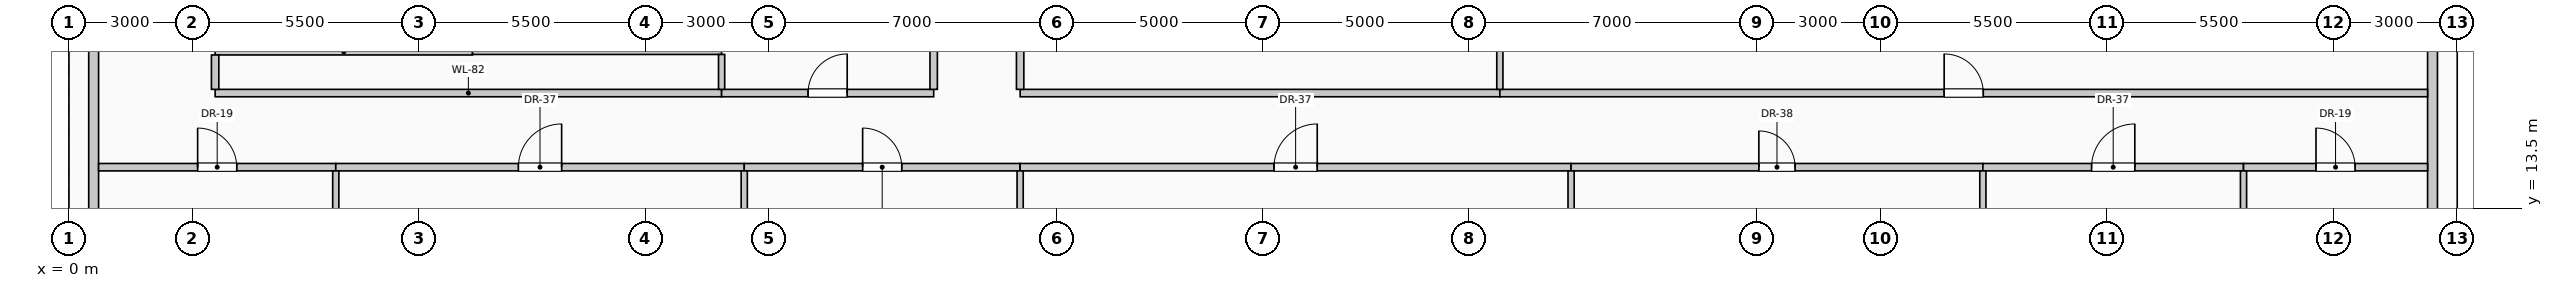
"""IFC4 building model, lengths in metres.
Left out: names, types, materials, properties, quantities, classifications, styles, units other than length and angle.
Written with IfcOpenShell. Run it as: python <this file> out.ifc"""

import sys

from ifc_helpers import new_model, si_unit, direction, frame, frame_2d, origin, place, context, subcontext, project, spatial, rectangle, extrude, element, fill, save


model = new_model("IFC4")
c1 = context("Model", 3, precision=1e-05, world=origin(), true_north=direction((0.0, 1.0)))
c2 = subcontext(c1, "Body", "Model", "MODEL_VIEW")
j1 = project(units=[si_unit("LENGTHUNIT", "METRE"), si_unit("PLANEANGLEUNIT", "RADIAN")], contexts=[c1])
p1 = place(None, origin())
s1 = spatial("IfcSite", under=j1, at=p1, CompositionType="ELEMENT")
p2 = place(p1, origin())
s2 = spatial("IfcBuilding", under=s1, at=p2, CompositionType="ELEMENT")
p3 = place(p2, frame((0.0, 0.0, 206.6)))
s3 = spatial("IfcBuildingStorey", under=s2, at=p3, CompositionType="ELEMENT", Elevation=206.6)
p4 = place(p3, frame((0.6, 10.42, 0.0), z_axis=(0.0, 0.0, 1.0), x_axis=(0.0, 1.0, 0.0)))
e1 = element("IfcWall", 1, at=p4, inside=s3, PredefinedType="SOLIDWALL", context=c2, shape_type="SweptSolid", body=[
    extrude(rectangle(XDim=7.16, YDim=0.24, at=frame_2d((3.58, 0.0))), origin(), (0.0, 0.0, 1.0), 3.0),
])
p5 = place(p4, frame((1.187, 0.0, 0.42)))
e2 = element("IfcOpeningElement", 2, at=p5, cuts=e1, PredefinedType="OPENING", context=c2, shape_type="SweptSolid", body=[
    extrude(rectangle(XDim=1.8, YDim=2.2, at=frame_2d((0.9, 1.1))), frame((0.0, 0.13, 0.0), z_axis=(0.0, -1.0, 0.0), x_axis=(1.0, 0.0, 0.0)), (0.0, 0.0, 1.0), 0.26),
])
p6 = place(p3, frame((57.4, 17.58, 0.0), z_axis=(0.0, 0.0, 1.0), x_axis=(0.0, -1.0, 0.0)))
e3 = element("IfcWall", 3, at=p6, inside=s3, PredefinedType="SOLIDWALL", context=c2, shape_type="SweptSolid", body=[
    extrude(rectangle(XDim=7.16, YDim=0.24, at=frame_2d((3.58, 0.0))), origin(), (0.0, 0.0, 1.0), 3.0),
])
p7 = place(p6, frame((4.173, 0.0, 0.42)))
e4 = element("IfcOpeningElement", 4, at=p7, cuts=e3, PredefinedType="OPENING", context=c2, shape_type="SweptSolid", body=[
    extrude(rectangle(XDim=1.8, YDim=2.2, at=frame_2d((0.9, 1.1))), frame((0.0, 0.13, 0.0), z_axis=(0.0, -1.0, 0.0), x_axis=(1.0, 0.0, 0.0)), (0.0, 0.0, 1.0), 0.26),
])
p8 = place(p3, frame((0.72, 14.5, 0.0), z_axis=(0.0, 0.0, 1.0), x_axis=(1.0, 0.0, 0.0)))
e5 = element("IfcWall", 5, at=p8, inside=s3, PredefinedType="PARTITIONING", context=c2, shape_type="SweptSolid", body=[
    extrude(rectangle(XDim=5.76, YDim=0.18, at=frame_2d((2.88, 0.0))), origin(), (0.0, 0.0, 1.0), 3.75),
])
p9 = place(p8, frame((2.405, 0.0, 0.0)))
e6 = element("IfcOpeningElement", 6, at=p9, cuts=e5, PredefinedType="OPENING", context=c2, shape_type="SweptSolid", body=[
    extrude(rectangle(XDim=0.95, YDim=2.15, at=frame_2d((0.475, 1.075))), frame((0.0, 0.1, 0.0), z_axis=(0.0, -1.0, 0.0), x_axis=(1.0, 0.0, 0.0)), (0.0, 0.0, 1.0), 0.2),
])
p10 = place(p3, frame((6.48, 14.5, 0.0), z_axis=(0.0, 0.0, 1.0), x_axis=(1.0, 0.0, 0.0)))
e7 = element("IfcWall", 7, at=p10, inside=s3, PredefinedType="PARTITIONING", context=c2, shape_type="SweptSolid", body=[
    extrude(rectangle(XDim=9.92, YDim=0.18, at=frame_2d((4.96, 0.0))), origin(), (0.0, 0.0, 1.0), 3.75),
])
p11 = place(p10, frame((4.435, 0.0, 0.0)))
e8 = element("IfcOpeningElement", 8, at=p11, cuts=e7, PredefinedType="OPENING", context=c2, shape_type="SweptSolid", body=[
    extrude(rectangle(XDim=1.05, YDim=2.15, at=frame_2d((0.525, 1.075))), frame((0.0, 0.1, 0.0), z_axis=(0.0, -1.0, 0.0), x_axis=(1.0, 0.0, 0.0)), (0.0, 0.0, 1.0), 0.2),
])
p12 = place(p3, frame((16.4, 14.5, 0.0), z_axis=(0.0, 0.0, 1.0), x_axis=(1.0, 0.0, 0.0)))
e9 = element("IfcWall", 9, at=p12, inside=s3, PredefinedType="PARTITIONING", context=c2, shape_type="SweptSolid", body=[
    extrude(rectangle(XDim=6.7, YDim=0.18, at=frame_2d((3.35, 0.0))), origin(), (0.0, 0.0, 1.0), 3.75),
])
p13 = place(p12, frame((2.875, 0.0, 0.0)))
e10 = element("IfcOpeningElement", 10, at=p13, cuts=e9, PredefinedType="OPENING", context=c2, shape_type="SweptSolid", body=[
    extrude(rectangle(XDim=0.95, YDim=2.15, at=frame_2d((0.475, 1.075))), frame((0.0, 0.1, 0.0), z_axis=(0.0, -1.0, 0.0), x_axis=(1.0, 0.0, 0.0)), (0.0, 0.0, 1.0), 0.2),
])
p14 = place(p3, frame((23.1, 14.5, 0.0), z_axis=(0.0, 0.0, 1.0), x_axis=(1.0, 0.0, 0.0)))
e11 = element("IfcWall", 11, at=p14, inside=s3, PredefinedType="PARTITIONING", context=c2, shape_type="SweptSolid", body=[
    extrude(rectangle(XDim=13.38, YDim=0.18, at=frame_2d((6.69, 0.0))), origin(), (0.0, 0.0, 1.0), 3.75),
])
p15 = place(p14, frame((6.165, 0.0, 0.0)))
e12 = element("IfcOpeningElement", 12, at=p15, cuts=e11, PredefinedType="OPENING", context=c2, shape_type="SweptSolid", body=[
    extrude(rectangle(XDim=1.05, YDim=2.15, at=frame_2d((0.525, 1.075))), frame((0.0, 0.1, 0.0), z_axis=(0.0, -1.0, 0.0), x_axis=(1.0, 0.0, 0.0)), (0.0, 0.0, 1.0), 0.2),
])
p16 = place(p3, frame((36.48, 14.5, 0.0), z_axis=(0.0, 0.0, 1.0), x_axis=(1.0, 0.0, 0.0)))
e13 = element("IfcWall", 13, at=p16, inside=s3, PredefinedType="PARTITIONING", context=c2, shape_type="SweptSolid", body=[
    extrude(rectangle(XDim=10.0, YDim=0.18, at=frame_2d((5.0, 0.0))), origin(), (0.0, 0.0, 1.0), 3.75),
])
p17 = place(p16, frame((4.56, 0.0, 0.0)))
e14 = element("IfcOpeningElement", 14, at=p17, cuts=e13, PredefinedType="OPENING", context=c2, shape_type="SweptSolid", body=[
    extrude(rectangle(XDim=0.88, YDim=2.1, at=frame_2d((0.44, 1.05))), frame((0.0, 0.1, 0.0), z_axis=(0.0, -1.0, 0.0), x_axis=(1.0, 0.0, 0.0)), (0.0, 0.0, 1.0), 0.2),
])
p18 = place(p3, frame((46.48, 14.5, 0.0), z_axis=(0.0, 0.0, 1.0), x_axis=(1.0, 0.0, 0.0)))
e15 = element("IfcWall", 15, at=p18, inside=s3, PredefinedType="PARTITIONING", context=c2, shape_type="SweptSolid", body=[
    extrude(rectangle(XDim=6.33, YDim=0.18, at=frame_2d((3.165, 0.0))), origin(), (0.0, 0.0, 1.0), 3.75),
])
p19 = place(p18, frame((2.64, 0.0, 0.0)))
e16 = element("IfcOpeningElement", 16, at=p19, cuts=e15, PredefinedType="OPENING", context=c2, shape_type="SweptSolid", body=[
    extrude(rectangle(XDim=1.05, YDim=2.15, at=frame_2d((0.525, 1.075))), frame((0.0, 0.1, 0.0), z_axis=(0.0, -1.0, 0.0), x_axis=(1.0, 0.0, 0.0)), (0.0, 0.0, 1.0), 0.2),
])
p20 = place(p3, frame((52.81, 14.5, 0.0), z_axis=(0.0, 0.0, 1.0), x_axis=(1.0, 0.0, 0.0)))
e17 = element("IfcWall", 17, at=p20, inside=s3, PredefinedType="PARTITIONING", context=c2, shape_type="SweptSolid", body=[
    extrude(rectangle(XDim=4.47, YDim=0.18, at=frame_2d((2.235, 0.0))), origin(), (0.0, 0.0, 1.0), 3.75),
])
p21 = place(p20, frame((1.76, 0.0, 0.0)))
e18 = element("IfcOpeningElement", 18, at=p21, cuts=e17, PredefinedType="OPENING", context=c2, shape_type="SweptSolid", body=[
    extrude(rectangle(XDim=0.95, YDim=2.15, at=frame_2d((0.475, 1.075))), frame((0.0, 0.1, 0.0), z_axis=(0.0, -1.0, 0.0), x_axis=(1.0, 0.0, 0.0)), (0.0, 0.0, 1.0), 0.2),
])
p22 = place(p3, frame((3.55, 16.3, 0.0), z_axis=(0.0, 0.0, 1.0), x_axis=(1.0, 0.0, 0.0)))
e19 = element("IfcWall", 19, at=p22, inside=s3, PredefinedType="PARTITIONING", context=c2, shape_type="SweptSolid", body=[
    extrude(rectangle(XDim=12.3, YDim=0.18, at=frame_2d((6.15, 0.0))), origin(), (0.0, 0.0, 1.0), 3.75),
])
p23 = place(p3, frame((15.85, 16.3, 0.0), z_axis=(0.0, 0.0, 1.0), x_axis=(1.0, 0.0, 0.0)))
e20 = element("IfcWall", 20, at=p23, inside=s3, PredefinedType="PARTITIONING", context=c2, shape_type="SweptSolid", body=[
    extrude(rectangle(XDim=5.15, YDim=0.18, at=frame_2d((2.575, 0.0))), origin(), (0.0, 0.0, 1.0), 3.75),
])
p24 = place(p23, frame((2.1, 0.0, 0.0)))
e21 = element("IfcOpeningElement", 21, at=p24, cuts=e20, PredefinedType="OPENING", context=c2, shape_type="SweptSolid", body=[
    extrude(rectangle(XDim=0.95, YDim=2.15, at=frame_2d((0.475, 1.075))), frame((0.0, 0.1, 0.0), z_axis=(0.0, -1.0, 0.0), x_axis=(1.0, 0.0, 0.0)), (0.0, 0.0, 1.0), 0.2),
])
p25 = place(p3, frame((23.1, 16.3, 0.0), z_axis=(0.0, 0.0, 1.0), x_axis=(1.0, 0.0, 0.0)))
e22 = element("IfcWall", 22, at=p25, inside=s3, PredefinedType="PARTITIONING", context=c2, shape_type="SweptSolid", body=[
    extrude(rectangle(XDim=11.65, YDim=0.18, at=frame_2d((5.825, 0.0))), origin(), (0.0, 0.0, 1.0), 3.75),
])
p26 = place(p3, frame((34.75, 16.3, 0.0), z_axis=(0.0, 0.0, 1.0), x_axis=(1.0, 0.0, 0.0)))
e23 = element("IfcWall", 23, at=p26, inside=s3, PredefinedType="PARTITIONING", context=c2, shape_type="SweptSolid", body=[
    extrude(rectangle(XDim=22.53, YDim=0.18, at=frame_2d((11.265, 0.0))), origin(), (0.0, 0.0, 1.0), 3.75),
])
p27 = place(p26, frame((10.79, 0.0, 0.0)))
e24 = element("IfcOpeningElement", 24, at=p27, cuts=e23, PredefinedType="OPENING", context=c2, shape_type="SweptSolid", body=[
    extrude(rectangle(XDim=0.95, YDim=2.15, at=frame_2d((0.475, 1.075))), frame((0.0, 0.1, 0.0), z_axis=(0.0, -1.0, 0.0), x_axis=(1.0, 0.0, 0.0)), (0.0, 0.0, 1.0), 0.2),
])
p28 = place(p3, frame((3.55, 17.3, 0.0), z_axis=(0.0, 0.0, 1.0), x_axis=(1.0, 0.0, 0.0)))
e25 = element("IfcWall", 25, at=p28, inside=s3, PredefinedType="PARTITIONING", context=c2, shape_type="SweptSolid", body=[
    extrude(rectangle(XDim=6.25, YDim=0.15, at=frame_2d((3.125, 0.0))), origin(), (0.0, 0.0, 1.0), 3.75),
])
p29 = place(p3, frame((9.8, 17.3, 0.0), z_axis=(0.0, 0.0, 1.0), x_axis=(1.0, 0.0, 0.0)))
e26 = element("IfcWall", 26, at=p29, inside=s3, PredefinedType="PARTITIONING", context=c2, shape_type="SweptSolid", body=[
    extrude(rectangle(XDim=6.05, YDim=0.125, at=frame_2d((3.025, 0.0))), origin(), (0.0, 0.0, 1.0), 3.75),
])
p30 = place(p3, frame((3.55, 16.39, 0.0), z_axis=(0.0, 0.0, 1.0), x_axis=(0.0, 1.0, 0.0)))
e27 = element("IfcWall", 27, at=p30, inside=s3, PredefinedType="PARTITIONING", context=c2, shape_type="SweptSolid", body=[
    extrude(rectangle(XDim=0.835, YDim=0.18, at=frame_2d((0.417, 0.0))), origin(), (0.0, 0.0, 1.0), 3.75),
])
p31 = place(p3, frame((6.48, 0.72, 0.0), z_axis=(0.0, 0.0, 1.0), x_axis=(0.0, 1.0, 0.0)))
e28 = element("IfcWall", 28, at=p31, inside=s3, PredefinedType="PARTITIONING", context=c2, shape_type="SweptSolid", body=[
    extrude(rectangle(XDim=13.69, YDim=0.15, at=frame_2d((6.845, 0.0))), origin(), (0.0, 0.0, 1.0), 3.75),
])
p32 = place(p3, frame((15.85, 16.39, 0.0), z_axis=(0.0, 0.0, 1.0), x_axis=(0.0, 1.0, 0.0)))
e29 = element("IfcWall", 29, at=p32, inside=s3, PredefinedType="PARTITIONING", context=c2, shape_type="SweptSolid", body=[
    extrude(rectangle(XDim=0.848, YDim=0.15, at=frame_2d((0.424, 0.0))), origin(), (0.0, 0.0, 1.0), 3.75),
])
p33 = place(p3, frame((16.4, 1.25, 0.0), z_axis=(0.0, 0.0, 1.0), x_axis=(0.0, 1.0, 0.0)))
e30 = element("IfcWall", 30, at=p33, inside=s3, PredefinedType="PARTITIONING", context=c2, shape_type="SweptSolid", body=[
    extrude(rectangle(XDim=13.16, YDim=0.15, at=frame_2d((6.58, 0.0))), origin(), (0.0, 0.0, 1.0), 3.145),
])
p34 = place(p3, frame((21.0, 16.39, 0.0), z_axis=(0.0, 0.0, 1.0), x_axis=(0.0, 1.0, 0.0)))
e31 = element("IfcWall", 31, at=p34, inside=s3, PredefinedType="PARTITIONING", context=c2, shape_type="SweptSolid", body=[
    extrude(rectangle(XDim=8.335, YDim=0.18, at=frame_2d((4.167, 0.0))), origin(), (0.0, 0.0, 1.0), 3.75),
])
p35 = place(p3, frame((23.1, 0.72, 0.0), z_axis=(0.0, 0.0, 1.0), x_axis=(0.0, 1.0, 0.0)))
e32 = element("IfcWall", 32, at=p35, inside=s3, PredefinedType="PARTITIONING", context=c2, shape_type="SweptSolid", body=[
    extrude(rectangle(XDim=13.69, YDim=0.15, at=frame_2d((6.845, 0.0))), origin(), (0.0, 0.0, 1.0), 3.75),
])
p36 = place(p3, frame((23.1, 16.39, 0.0), z_axis=(0.0, 0.0, 1.0), x_axis=(0.0, 1.0, 0.0)))
e33 = element("IfcWall", 33, at=p36, inside=s3, PredefinedType="PARTITIONING", context=c2, shape_type="SweptSolid", body=[
    extrude(rectangle(XDim=3.185, YDim=0.18, at=frame_2d((1.593, 0.0))), origin(), (0.0, 0.0, 1.0), 3.75),
])
p37 = place(p3, frame((34.75, 16.39, 0.0), z_axis=(0.0, 0.0, 1.0), x_axis=(0.0, 1.0, 0.0)))
e34 = element("IfcWall", 34, at=p37, inside=s3, PredefinedType="PARTITIONING", context=c2, shape_type="SweptSolid", body=[
    extrude(rectangle(XDim=3.185, YDim=0.15, at=frame_2d((1.593, 0.0))), origin(), (0.0, 0.0, 1.0), 3.75),
])
for number, where, z_axis, x_axis in (
    (35, (36.48, 0.72, 0.0), (0.0, 0.0, 1.0), (0.0, 1.0, 0.0)),
    (36, (46.48, 0.72, 0.0), (0.0, 0.0, 1.0), (0.0, 1.0, 0.0)),
    (37, (52.81, 0.72, 0.0), (0.0, 0.0, 1.0), (0.0, 1.0, 0.0)),
):
    element("IfcWall", number, at=place(p3, frame(where, z_axis=z_axis, x_axis=x_axis)), inside=s3, PredefinedType="PARTITIONING", context=c2, shape_type="SweptSolid", body=[
        extrude(rectangle(XDim=13.69, YDim=0.15, at=frame_2d((6.845, 0.0))), origin(), (0.0, 0.0, 1.0), 3.75),
    ])
p38 = place(p9, origin())
e38 = element("IfcDoor", 38, at=p38, inside=s3, OperationType="SINGLE_SWING_LEFT", PredefinedType="DOOR", context=c2, shape_type="SweptSolid", body=[
    extrude(rectangle(XDim=0.95, YDim=2.15, at=frame_2d((0.475, 1.075))), frame((0.0, 0.025, 0.0), z_axis=(0.0, -1.0, 0.0), x_axis=(1.0, 0.0, 0.0)), (0.0, 0.0, 1.0), 0.05),
])
fill(e6, e38)
p39 = place(p11, origin())
e39 = element("IfcDoor", 39, at=p39, inside=s3, OperationType="SINGLE_SWING_RIGHT", PredefinedType="DOOR", context=c2, shape_type="SweptSolid", body=[
    extrude(rectangle(XDim=1.05, YDim=2.15, at=frame_2d((0.525, 1.075))), frame((0.0, 0.025, 0.0), z_axis=(0.0, -1.0, 0.0), x_axis=(1.0, 0.0, 0.0)), (0.0, 0.0, 1.0), 0.05),
])
fill(e8, e39)
p40 = place(p13, origin())
e40 = element("IfcDoor", 40, at=p40, inside=s3, OperationType="SINGLE_SWING_LEFT", PredefinedType="DOOR", context=c2, shape_type="SweptSolid", body=[
    extrude(rectangle(XDim=0.95, YDim=2.15, at=frame_2d((0.475, 1.075))), frame((0.0, 0.025, 0.0), z_axis=(0.0, -1.0, 0.0), x_axis=(1.0, 0.0, 0.0)), (0.0, 0.0, 1.0), 0.05),
])
fill(e10, e40)
p41 = place(p15, origin())
e41 = element("IfcDoor", 41, at=p41, inside=s3, OperationType="SINGLE_SWING_RIGHT", PredefinedType="DOOR", context=c2, shape_type="SweptSolid", body=[
    extrude(rectangle(XDim=1.05, YDim=2.15, at=frame_2d((0.525, 1.075))), frame((0.0, 0.025, 0.0), z_axis=(0.0, -1.0, 0.0), x_axis=(1.0, 0.0, 0.0)), (0.0, 0.0, 1.0), 0.05),
])
fill(e12, e41)
p42 = place(p17, origin())
e42 = element("IfcDoor", 42, at=p42, inside=s3, OperationType="SINGLE_SWING_LEFT", PredefinedType="DOOR", context=c2, shape_type="SweptSolid", body=[
    extrude(rectangle(XDim=0.88, YDim=2.1, at=frame_2d((0.44, 1.05))), frame((0.0, 0.025, 0.0), z_axis=(0.0, -1.0, 0.0), x_axis=(1.0, 0.0, 0.0)), (0.0, 0.0, 1.0), 0.05),
])
fill(e14, e42)
p43 = place(p19, origin())
e43 = element("IfcDoor", 43, at=p43, inside=s3, OperationType="SINGLE_SWING_RIGHT", PredefinedType="DOOR", context=c2, shape_type="SweptSolid", body=[
    extrude(rectangle(XDim=1.05, YDim=2.15, at=frame_2d((0.525, 1.075))), frame((0.0, 0.025, 0.0), z_axis=(0.0, -1.0, 0.0), x_axis=(1.0, 0.0, 0.0)), (0.0, 0.0, 1.0), 0.05),
])
fill(e16, e43)
p44 = place(p21, origin())
e44 = element("IfcDoor", 44, at=p44, inside=s3, OperationType="SINGLE_SWING_LEFT", PredefinedType="DOOR", context=c2, shape_type="SweptSolid", body=[
    extrude(rectangle(XDim=0.95, YDim=2.15, at=frame_2d((0.475, 1.075))), frame((0.0, 0.025, 0.0), z_axis=(0.0, -1.0, 0.0), x_axis=(1.0, 0.0, 0.0)), (0.0, 0.0, 1.0), 0.05),
])
fill(e18, e44)
p45 = place(p24, origin())
e45 = element("IfcDoor", 45, at=p45, inside=s3, OperationType="SINGLE_SWING_RIGHT", PredefinedType="DOOR", context=c2, shape_type="SweptSolid", body=[
    extrude(rectangle(XDim=0.95, YDim=2.15, at=frame_2d((0.475, 1.075))), frame((0.0, 0.025, 0.0), z_axis=(0.0, -1.0, 0.0), x_axis=(1.0, 0.0, 0.0)), (0.0, 0.0, 1.0), 0.05),
])
fill(e21, e45)
p46 = place(p27, origin())
e46 = element("IfcDoor", 46, at=p46, inside=s3, OperationType="SINGLE_SWING_LEFT", PredefinedType="DOOR", context=c2, shape_type="SweptSolid", body=[
    extrude(rectangle(XDim=0.95, YDim=2.15, at=frame_2d((0.475, 1.075))), frame((0.0, 0.025, 0.0), z_axis=(0.0, -1.0, 0.0), x_axis=(1.0, 0.0, 0.0)), (0.0, 0.0, 1.0), 0.05),
])
fill(e24, e46)
save(model, sys.argv[1])
